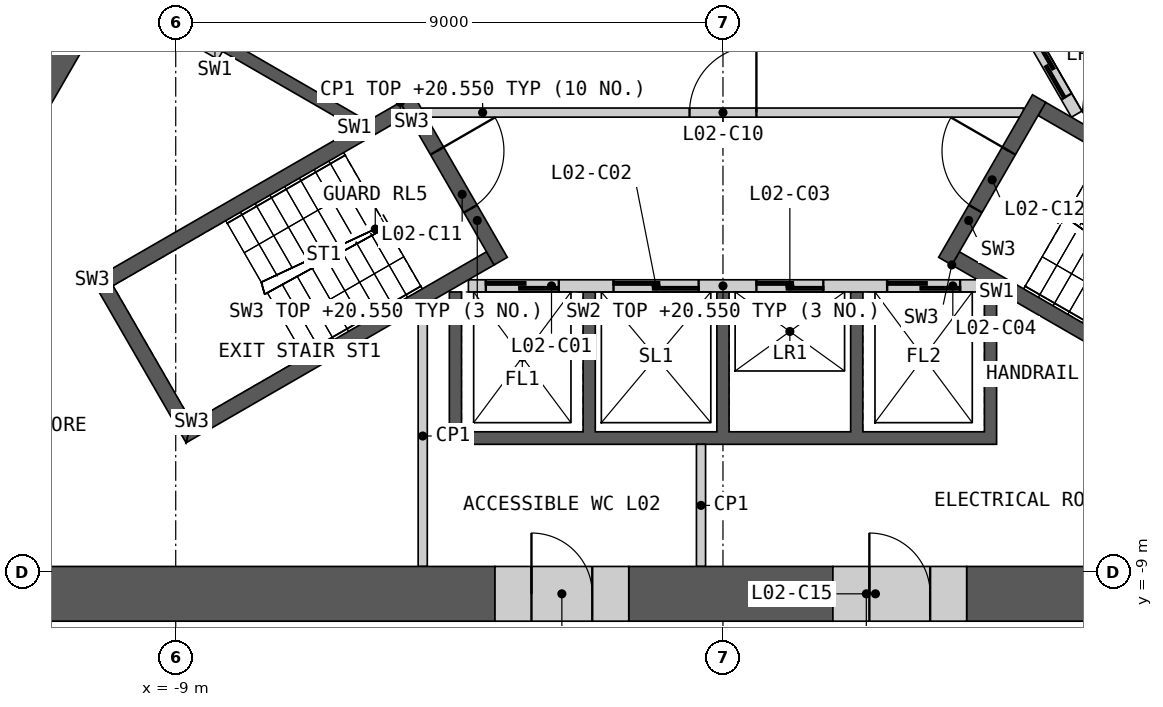
"""IFC4 building model, lengths in metres.
Left out: names, types, materials, properties, quantities, classifications, styles, units other than length and angle.
Written with IfcOpenShell. Run it as: python <this file> out.ifc"""

import sys

from ifc_helpers import new_model, si_unit, direction, frame, frame_2d, origin, place, context, subcontext, project, spatial, polyline, rectangle, outline, extrude, element, fill, save


model = new_model("IFC4")
c1 = context("Model", 3, precision=1e-05, world=origin(), true_north=direction((0.0, 1.0)))
c2 = subcontext(c1, "Body", "Model", "MODEL_VIEW")
j1 = project(units=[si_unit("LENGTHUNIT", "METRE"), si_unit("PLANEANGLEUNIT", "RADIAN")], contexts=[c1])
p1 = place(None, origin())
s1 = spatial("IfcSite", under=j1, at=p1, CompositionType="ELEMENT")
p2 = place(p1, origin())
s2 = spatial("IfcBuilding", under=s1, at=p2, CompositionType="ELEMENT")
p3 = place(p2, frame((0.0, 0.0, 15.5)))
s3 = spatial("IfcBuildingStorey", under=s2, at=p3, CompositionType="ELEMENT", Elevation=15.5)
p4 = place(p3, origin())
e1 = element("IfcWall", 1, at=p4, inside=s3, PredefinedType="SHEAR", context=c2, shape_type="SweptSolid", body=[
    extrude(outline(polyline([(4.5, -4.4), (4.5, -6.906), (-4.5, -6.906), (-4.5, -4.4), (-4.3, -4.4), (-4.3, -6.7), (-2.3, -6.7), (-2.3, -4.4), (-2.1, -4.4), (-2.1, -6.7), (-0.1, -6.7), (-0.1, -4.4), (0.1, -4.4), (0.1, -6.7), (2.1, -6.7), (2.1, -4.4), (2.3, -4.4), (2.3, -6.7), (4.3, -6.7), (4.3, -4.4), (4.5, -4.4)])), origin(), (0.0, 0.0, 1.0), 5.05),
])
p5 = place(p3, frame((-4.187, -4.3, 0.0), z_axis=(0.0, 0.0, 1.0), x_axis=(1.0, 0.0, 0.0)))
e2 = element("IfcWall", 2, at=p5, inside=s3, PredefinedType="SOLIDWALL", context=c2, shape_type="SweptSolid", body=[
    extrude(rectangle(XDim=8.373, YDim=0.2, at=frame_2d((4.187, 0.0))), origin(), (0.0, 0.0, 1.0), 5.05),
])
p6 = place(p5, frame((0.287, 0.0, 0.0)))
e3 = element("IfcOpeningElement", 3, at=p6, cuts=e2, PredefinedType="OPENING", context=c2, shape_type="SweptSolid", body=[
    extrude(rectangle(XDim=1.2, YDim=2.1, at=frame_2d((0.6, 1.05))), frame((0.0, 0.11, 0.0), z_axis=(0.0, -1.0, 0.0), x_axis=(1.0, 0.0, 0.0)), (0.0, 0.0, 1.0), 0.22),
])
p7 = place(p5, frame((2.387, 0.0, 0.0)))
e4 = element("IfcOpeningElement", 4, at=p7, cuts=e2, PredefinedType="OPENING", context=c2, shape_type="SweptSolid", body=[
    extrude(rectangle(XDim=1.4, YDim=2.1, at=frame_2d((0.7, 1.05))), frame((0.0, 0.11, 0.0), z_axis=(0.0, -1.0, 0.0), x_axis=(1.0, 0.0, 0.0)), (0.0, 0.0, 1.0), 0.22),
])
p8 = place(p5, frame((4.737, 0.0, 0.0)))
e5 = element("IfcOpeningElement", 5, at=p8, cuts=e2, PredefinedType="OPENING", context=c2, shape_type="SweptSolid", body=[
    extrude(rectangle(XDim=1.1, YDim=2.1, at=frame_2d((0.55, 1.05))), frame((0.0, 0.11, 0.0), z_axis=(0.0, -1.0, 0.0), x_axis=(1.0, 0.0, 0.0)), (0.0, 0.0, 1.0), 0.22),
])
p9 = place(p5, frame((6.887, 0.0, 0.0)))
e6 = element("IfcOpeningElement", 6, at=p9, cuts=e2, PredefinedType="OPENING", context=c2, shape_type="SweptSolid", body=[
    extrude(rectangle(XDim=1.2, YDim=2.1, at=frame_2d((0.6, 1.05))), frame((0.0, 0.11, 0.0), z_axis=(0.0, -1.0, 0.0), x_axis=(1.0, 0.0, 0.0)), (0.0, 0.0, 1.0), 0.22),
])
p10 = place(p3, origin())
e7 = element("IfcWall", 7, at=p10, inside=s3, PredefinedType="SHEAR", context=c2, shape_type="SweptSolid", body=[
    extrude(outline(polyline([(2.66, 4.192), (4.831, 5.445), (8.231, -0.444), (6.061, -1.697), (5.96, -1.524), (7.952, -0.374), (6.952, 1.358), (4.96, 0.208), (4.861, 0.381), (6.852, 1.531), (5.852, 3.263), (3.861, 2.113), (3.76, 2.287), (5.752, 3.437), (4.752, 5.169), (2.76, 4.019), (2.66, 4.192)])), origin(), (0.0, 0.0, 1.0), 5.05),
])
p11 = place(p3, frame((5.817, -1.476, 0.0), z_axis=(0.0, 0.0, 1.0), x_axis=(-0.500002616675, 0.866023893041, 0.0)))
e8 = element("IfcWall", 8, at=p11, inside=s3, PredefinedType="SOLIDWALL", context=c2, shape_type="SweptSolid", body=[
    extrude(rectangle(XDim=8.373, YDim=0.2, at=frame_2d((4.187, 0.0))), origin(), (0.0, 0.0, 1.0), 5.05),
])
p12 = place(p11, frame((0.337, 0.0, 0.0)))
e9 = element("IfcOpeningElement", 9, at=p12, cuts=e8, PredefinedType="OPENING", context=c2, shape_type="SweptSolid", body=[
    extrude(rectangle(XDim=1.1, YDim=2.1, at=frame_2d((0.55, 1.05))), frame((0.0, 0.11, 0.0), z_axis=(0.0, -1.0, 0.0), x_axis=(1.0, 0.0, 0.0)), (0.0, 0.0, 1.0), 0.22),
])
p13 = place(p11, frame((2.537, 0.0, 0.0)))
e10 = element("IfcOpeningElement", 10, at=p13, cuts=e8, PredefinedType="OPENING", context=c2, shape_type="SweptSolid", body=[
    extrude(rectangle(XDim=1.1, YDim=2.1, at=frame_2d((0.55, 1.05))), frame((0.0, 0.11, 0.0), z_axis=(0.0, -1.0, 0.0), x_axis=(1.0, 0.0, 0.0)), (0.0, 0.0, 1.0), 0.22),
])
p14 = place(p11, frame((4.737, 0.0, 0.0)))
e11 = element("IfcOpeningElement", 11, at=p14, cuts=e8, PredefinedType="OPENING", context=c2, shape_type="SweptSolid", body=[
    extrude(rectangle(XDim=1.1, YDim=2.1, at=frame_2d((0.55, 1.05))), frame((0.0, 0.11, 0.0), z_axis=(0.0, -1.0, 0.0), x_axis=(1.0, 0.0, 0.0)), (0.0, 0.0, 1.0), 0.22),
])
p15 = place(p11, frame((7.037, 0.0, 0.0)))
e12 = element("IfcOpeningElement", 12, at=p15, cuts=e8, PredefinedType="OPENING", context=c2, shape_type="SweptSolid", body=[
    extrude(rectangle(XDim=0.9, YDim=2.1, at=frame_2d((0.45, 1.05))), frame((0.0, 0.11, 0.0), z_axis=(0.0, -1.0, 0.0), x_axis=(1.0, 0.0, 0.0)), (0.0, 0.0, 1.0), 0.22),
])
p16 = place(p3, origin())
e13 = element("IfcWall", 13, at=p16, inside=s3, PredefinedType="SHEAR", context=c2, shape_type="SweptSolid", body=[
    extrude(outline(polyline([(-6.061, -1.697), (-8.231, -0.444), (-8.131, -0.271), (-5.96, -1.524), (-6.061, -1.697)])), origin(), (0.0, 0.0, 1.0), 5.05),
])
p17 = place(p3, frame((-4.941, -1.45, 0.0), z_axis=(0.0, 0.0, 1.0), x_axis=(1.0, 0.0, 0.0)))
e14 = element("IfcWall", 14, at=p17, inside=s3, PredefinedType="PARTITIONING", context=c2, shape_type="SweptSolid", body=[
    extrude(rectangle(XDim=9.882, YDim=0.15, at=frame_2d((4.941, 0.0))), origin(), (0.0, 0.0, 1.0), 5.05),
])
p18 = place(p17, frame((4.391, 0.0, 0.0)))
e15 = element("IfcOpeningElement", 15, at=p18, cuts=e14, PredefinedType="OPENING", context=c2, shape_type="SweptSolid", body=[
    extrude(rectangle(XDim=1.1, YDim=2.1, at=frame_2d((0.55, 1.05))), frame((0.0, 0.085, 0.0), z_axis=(0.0, -1.0, 0.0), x_axis=(1.0, 0.0, 0.0)), (0.0, 0.0, 1.0), 0.17),
])
p19 = place(p3, origin())
e16 = element("IfcWall", 16, at=p19, inside=s3, PredefinedType="SHEAR", context=c2, shape_type="SweptSolid", body=[
    extrude(outline(polyline([(-5.307, -1.281), (-10.374, -4.206), (-10.032, -4.298), (-5.182, -1.498), (-5.307, -1.281)])), origin(), (0.0, 0.0, 1.0), 5.05),
])
p20 = place(p3, origin())
e17 = element("IfcWall", 17, at=p20, inside=s3, PredefinedType="SHEAR", context=c2, shape_type="SweptSolid", body=[
    extrude(outline(polyline([(-10.374, -4.206), (-8.83, -6.881), (-8.738, -6.539), (-10.032, -4.298), (-10.374, -4.206)])), origin(), (0.0, 0.0, 1.0), 5.05),
])
p21 = place(p3, origin())
e18 = element("IfcWall", 18, at=p21, inside=s3, PredefinedType="SHEAR", context=c2, shape_type="SweptSolid", body=[
    extrude(outline(polyline([(-8.738, -6.539), (-8.83, -6.881), (-3.763, -3.956), (-3.888, -3.739), (-8.738, -6.539)])), origin(), (0.0, 0.0, 1.0), 5.05),
])
p22 = place(p3, frame((-5.199, -1.219, 0.0), z_axis=(0.0, 0.0, 1.0), x_axis=(0.499982516597, -0.866035497597, 0.0)))
e19 = element("IfcWall", 19, at=p22, inside=s3, PredefinedType="SHEAR", context=c2, shape_type="SweptSolid", body=[
    extrude(rectangle(XDim=3.088, YDim=0.25, at=frame_2d((1.544, 0.0))), origin(), (0.0, 0.0, 1.0), 5.05),
])
p23 = place(p22, frame((0.994, 0.0, 0.0)))
e20 = element("IfcOpeningElement", 20, at=p23, cuts=e19, PredefinedType="OPENING", context=c2, shape_type="SweptSolid", body=[
    extrude(rectangle(XDim=1.1, YDim=2.1, at=frame_2d((0.55, 1.05))), frame((0.0, 0.135, 0.0), z_axis=(0.0, -1.0, 0.0), x_axis=(1.0, 0.0, 0.0)), (0.0, 0.0, 1.0), 0.27),
])
p24 = place(p3, origin())
e21 = element("IfcWall", 21, at=p24, inside=s3, PredefinedType="SHEAR", context=c2, shape_type="SweptSolid", body=[
    extrude(outline(polyline([(3.763, -3.956), (8.83, -6.881), (8.738, -6.539), (3.888, -3.739), (3.763, -3.956)])), origin(), (0.0, 0.0, 1.0), 5.05),
])
p25 = place(p3, origin())
e22 = element("IfcWall", 22, at=p25, inside=s3, PredefinedType="SHEAR", context=c2, shape_type="SweptSolid", body=[
    extrude(outline(polyline([(10.032, -4.298), (10.374, -4.206), (5.307, -1.281), (5.182, -1.498), (10.032, -4.298)])), origin(), (0.0, 0.0, 1.0), 5.05),
])
p26 = place(p3, frame((3.655, -3.893, 0.0), z_axis=(0.0, 0.0, 1.0), x_axis=(0.499982516597, 0.866035497597, 0.0)))
e23 = element("IfcWall", 23, at=p26, inside=s3, PredefinedType="SHEAR", context=c2, shape_type="SweptSolid", body=[
    extrude(rectangle(XDim=3.088, YDim=0.25, at=frame_2d((1.544, 0.0))), origin(), (0.0, 0.0, 1.0), 5.05),
])
p27 = place(p26, frame((0.994, 0.0, 0.0)))
e24 = element("IfcOpeningElement", 24, at=p27, cuts=e23, PredefinedType="OPENING", context=c2, shape_type="SweptSolid", body=[
    extrude(rectangle(XDim=1.1, YDim=2.1, at=frame_2d((0.55, 1.05))), frame((0.0, 0.135, 0.0), z_axis=(0.0, -1.0, 0.0), x_axis=(1.0, 0.0, 0.0)), (0.0, 0.0, 1.0), 0.27),
])
p28 = place(p3, frame((-8.268, -0.509, 0.0), z_axis=(0.0, 0.0, 1.0), x_axis=(-0.866035824272, 0.499981950752, 0.0)))
e25 = element("IfcWall", 25, at=p28, inside=s3, PredefinedType="PARTITIONING", context=c2, shape_type="SweptSolid", body=[
    extrude(rectangle(XDim=2.009, YDim=0.15, at=frame_2d((1.004, 0.0))), origin(), (0.0, 0.0, 1.0), 5.05),
])
p29 = place(p3, frame((-0.361, -8.915, 0.0), z_axis=(0.0, 0.0, 1.0), x_axis=(0.0, 1.0, 0.0)))
e26 = element("IfcWall", 26, at=p29, inside=s3, PredefinedType="PARTITIONING", context=c2, shape_type="SweptSolid", body=[
    extrude(rectangle(XDim=2.009, YDim=0.15, at=frame_2d((1.004, 0.0))), origin(), (0.0, 0.0, 1.0), 5.05),
])
p30 = place(p3, frame((-4.938, -8.915, 0.0), z_axis=(0.0, 0.0, 1.0), x_axis=(0.0, 1.0, 0.0)))
e27 = element("IfcWall", 27, at=p30, inside=s3, PredefinedType="PARTITIONING", context=c2, shape_type="SweptSolid", body=[
    extrude(rectangle(XDim=4.291, YDim=0.15, at=frame_2d((2.146, 0.0))), origin(), (0.0, 0.0, 1.0), 5.05),
])
p31 = place(p3, frame((-15.441, -9.365, 0.0), z_axis=(0.0, 0.0, 1.0), x_axis=(1.0, 0.0, 0.0)))
e28 = element("IfcWall", 28, at=p31, inside=s3, PredefinedType="SHEAR", context=c2, shape_type="SweptSolid", body=[
    extrude(rectangle(XDim=11.692, YDim=0.9, at=frame_2d((5.846, 0.0))), origin(), (0.0, 0.0, 1.0), 5.05),
])
p32 = place(p3, frame((4.008, -9.365, 0.0), z_axis=(0.0, 0.0, 1.0), x_axis=(1.0, 0.0, 0.0)))
e29 = element("IfcWall", 29, at=p32, inside=s3, PredefinedType="SHEAR", context=c2, shape_type="SweptSolid", body=[
    extrude(rectangle(XDim=5.739, YDim=0.9, at=frame_2d((2.869, 0.0))), origin(), (0.0, 0.0, 1.0), 5.05),
])
p33 = place(p3, frame((-1.55, -9.365, 0.0), z_axis=(0.0, 0.0, 1.0), x_axis=(1.0, 0.0, 0.0)))
e30 = element("IfcWall", 30, at=p33, inside=s3, PredefinedType="SHEAR", context=c2, shape_type="SweptSolid", body=[
    extrude(rectangle(XDim=3.357, YDim=0.9, at=frame_2d((1.679, 0.0))), origin(), (0.0, 0.0, 1.0), 5.05),
])
p34 = place(p3, frame((-10.31, 0.872, 0.0), z_axis=(0.0, 0.0, 1.0), x_axis=(-0.499968858743, -0.866043382451, 0.0)))
e31 = element("IfcWall", 31, at=p34, inside=s3, PredefinedType="SHEAR", context=c2, shape_type="SweptSolid", body=[
    extrude(rectangle(XDim=4.546, YDim=0.9, at=frame_2d((2.273, 0.0))), origin(), (0.0, 0.0, 1.0), 5.05),
])
p35 = place(p3, frame((-3.75, -9.365, 0.0), z_axis=(0.0, 0.0, 1.0), x_axis=(1.0, 0.0, 0.0)))
e32 = element("IfcWall", 32, at=p35, inside=s3, PredefinedType="SHEAR", context=c2, shape_type="SweptSolid", body=[
    extrude(rectangle(XDim=2.2, YDim=0.9, at=frame_2d((1.1, 0.0))), origin(), (0.0, 0.0, 1.0), 5.05),
])
p36 = place(p35, frame((0.6, 0.0, 0.0)))
e33 = element("IfcOpeningElement", 33, at=p36, cuts=e32, PredefinedType="OPENING", context=c2, shape_type="SweptSolid", body=[
    extrude(rectangle(XDim=1.0, YDim=2.1, at=frame_2d((0.5, 1.05))), frame((0.0, 0.46, 0.0), z_axis=(0.0, -1.0, 0.0), x_axis=(1.0, 0.0, 0.0)), (0.0, 0.0, 1.0), 0.92),
])
p37 = place(p3, frame((1.808, -9.365, 0.0), z_axis=(0.0, 0.0, 1.0), x_axis=(1.0, 0.0, 0.0)))
e34 = element("IfcWall", 34, at=p37, inside=s3, PredefinedType="SHEAR", context=c2, shape_type="SweptSolid", body=[
    extrude(rectangle(XDim=2.2, YDim=0.9, at=frame_2d((1.1, 0.0))), origin(), (0.0, 0.0, 1.0), 5.05),
])
p38 = place(p37, frame((0.6, 0.0, 0.0)))
e35 = element("IfcOpeningElement", 35, at=p38, cuts=e34, PredefinedType="OPENING", context=c2, shape_type="SweptSolid", body=[
    extrude(rectangle(XDim=1.0, YDim=2.1, at=frame_2d((0.5, 1.05))), frame((0.0, 0.46, 0.0), z_axis=(0.0, -1.0, 0.0), x_axis=(1.0, 0.0, 0.0)), (0.0, 0.0, 1.0), 0.92),
])
p39 = place(p3, frame((-15.634, -2.648, 0.0), z_axis=(0.0, 0.0, 1.0), x_axis=(0.500017363087, 0.866015378969, 0.0)))
e36 = element("IfcWall", 36, at=p39, inside=s3, PredefinedType="PARTITIONING", context=c2, shape_type="SweptSolid", body=[
    extrude(rectangle(XDim=9.77, YDim=0.2, at=frame_2d((4.885, 0.0))), origin(), (0.0, 0.0, 1.0), 5.05),
])
p40 = place(p39, frame((4.086, 0.0, 0.0)))
e37 = element("IfcOpeningElement", 37, at=p40, cuts=e36, PredefinedType="OPENING", context=c2, shape_type="SweptSolid", body=[
    extrude(rectangle(XDim=1.8, YDim=2.1, at=frame_2d((0.9, 1.05))), frame((0.0, 0.11, 0.0), z_axis=(0.0, -1.0, 0.0), x_axis=(1.0, 0.0, 0.0)), (0.0, 0.0, 1.0), 0.22),
])
p41 = place(p6, origin())
e38 = element("IfcDoor", 38, at=p41, inside=s3, OperationType="SLIDING_TO_LEFT", PredefinedType="DOOR", context=c2, shape_type="SweptSolid", body=[
    extrude(rectangle(XDim=1.2, YDim=2.1, at=frame_2d((0.6, 1.05))), frame((0.0, 0.025, 0.0), z_axis=(0.0, -1.0, 0.0), x_axis=(1.0, 0.0, 0.0)), (0.0, 0.0, 1.0), 0.05),
])
fill(e3, e38)
p42 = place(p7, origin())
e39 = element("IfcDoor", 39, at=p42, inside=s3, OperationType="SLIDING_TO_LEFT", PredefinedType="DOOR", context=c2, shape_type="SweptSolid", body=[
    extrude(rectangle(XDim=1.4, YDim=2.1, at=frame_2d((0.7, 1.05))), frame((0.0, 0.025, 0.0), z_axis=(0.0, -1.0, 0.0), x_axis=(1.0, 0.0, 0.0)), (0.0, 0.0, 1.0), 0.05),
])
fill(e4, e39)
p43 = place(p8, origin())
e40 = element("IfcDoor", 40, at=p43, inside=s3, OperationType="SLIDING_TO_LEFT", PredefinedType="DOOR", context=c2, shape_type="SweptSolid", body=[
    extrude(rectangle(XDim=1.1, YDim=2.1, at=frame_2d((0.55, 1.05))), frame((0.0, 0.025, 0.0), z_axis=(0.0, -1.0, 0.0), x_axis=(1.0, 0.0, 0.0)), (0.0, 0.0, 1.0), 0.05),
])
fill(e5, e40)
p44 = place(p9, origin())
e41 = element("IfcDoor", 41, at=p44, inside=s3, OperationType="SLIDING_TO_LEFT", PredefinedType="DOOR", context=c2, shape_type="SweptSolid", body=[
    extrude(rectangle(XDim=1.2, YDim=2.1, at=frame_2d((0.6, 1.05))), frame((0.0, 0.025, 0.0), z_axis=(0.0, -1.0, 0.0), x_axis=(1.0, 0.0, 0.0)), (0.0, 0.0, 1.0), 0.05),
])
fill(e6, e41)
p45 = place(p12, origin())
e42 = element("IfcDoor", 42, at=p45, inside=s3, OperationType="SLIDING_TO_LEFT", PredefinedType="DOOR", context=c2, shape_type="SweptSolid", body=[
    extrude(rectangle(XDim=1.1, YDim=2.1, at=frame_2d((0.55, 1.05))), frame((0.0, 0.025, 0.0), z_axis=(0.0, -1.0, 0.0), x_axis=(1.0, 0.0, 0.0)), (0.0, 0.0, 1.0), 0.05),
])
fill(e9, e42)
p46 = place(p18, origin())
e43 = element("IfcDoor", 43, at=p46, inside=s3, OperationType="SINGLE_SWING_RIGHT", PredefinedType="DOOR", context=c2, shape_type="SweptSolid", body=[
    extrude(rectangle(XDim=1.1, YDim=2.1, at=frame_2d((0.55, 1.05))), frame((0.0, 0.025, 0.0), z_axis=(0.0, -1.0, 0.0), x_axis=(1.0, 0.0, 0.0)), (0.0, 0.0, 1.0), 0.05),
])
fill(e15, e43)
p47 = place(p23, origin())
e44 = element("IfcDoor", 44, at=p47, inside=s3, OperationType="SINGLE_SWING_LEFT", PredefinedType="DOOR", context=c2, shape_type="SweptSolid", body=[
    extrude(rectangle(XDim=1.1, YDim=2.1, at=frame_2d((0.55, 1.05))), frame((0.0, 0.025, 0.0), z_axis=(0.0, -1.0, 0.0), x_axis=(1.0, 0.0, 0.0)), (0.0, 0.0, 1.0), 0.05),
])
fill(e20, e44)
p48 = place(p27, origin())
e45 = element("IfcDoor", 45, at=p48, inside=s3, OperationType="SINGLE_SWING_RIGHT", PredefinedType="DOOR", context=c2, shape_type="SweptSolid", body=[
    extrude(rectangle(XDim=1.1, YDim=2.1, at=frame_2d((0.55, 1.05))), frame((0.0, 0.025, 0.0), z_axis=(0.0, -1.0, 0.0), x_axis=(1.0, 0.0, 0.0)), (0.0, 0.0, 1.0), 0.05),
])
fill(e24, e45)
p49 = place(p36, origin())
e46 = element("IfcDoor", 46, at=p49, inside=s3, OperationType="SINGLE_SWING_LEFT", PredefinedType="DOOR", context=c2, shape_type="SweptSolid", body=[
    extrude(rectangle(XDim=1.0, YDim=2.1, at=frame_2d((0.5, 1.05))), frame((0.0, 0.205, 0.0), z_axis=(0.0, -1.0, 0.0), x_axis=(1.0, 0.0, 0.0)), (0.0, 0.0, 1.0), 0.05),
])
fill(e33, e46)
p50 = place(p38, origin())
e47 = element("IfcDoor", 47, at=p50, inside=s3, OperationType="SINGLE_SWING_LEFT", PredefinedType="DOOR", context=c2, shape_type="SweptSolid", body=[
    extrude(rectangle(XDim=1.0, YDim=2.1, at=frame_2d((0.5, 1.05))), frame((0.0, 0.205, 0.0), z_axis=(0.0, -1.0, 0.0), x_axis=(1.0, 0.0, 0.0)), (0.0, 0.0, 1.0), 0.05),
])
fill(e35, e47)
save(model, sys.argv[1])
